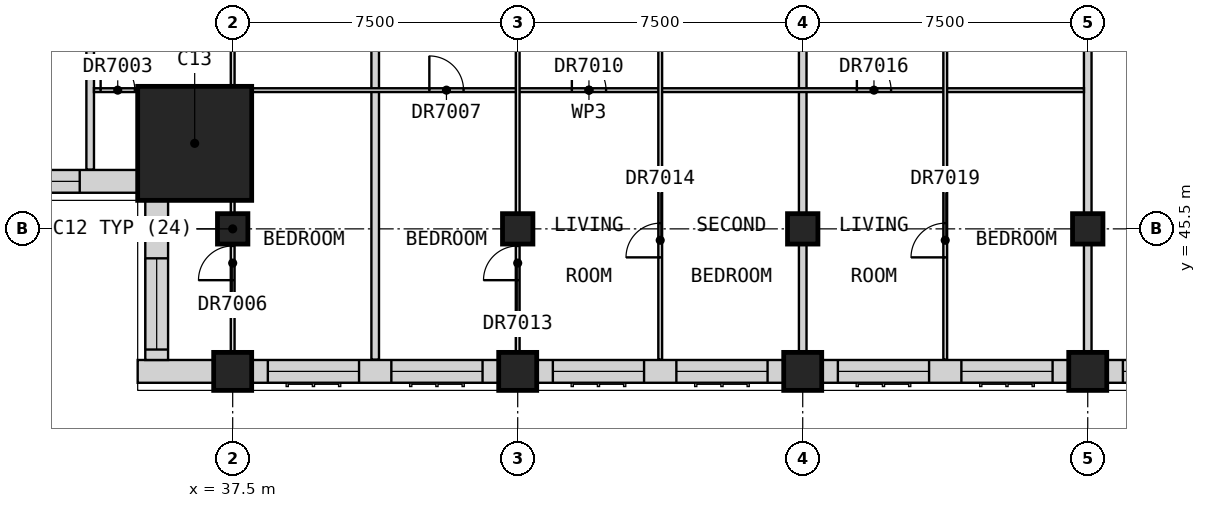
"""IFC4 building model, lengths in metres.
Left out: names, types, materials, properties, quantities, classifications, styles, units other than length and angle.
Written with IfcOpenShell. Run it as: python <this file> out.ifc"""

import sys

from ifc_helpers import new_model, si_unit, direction, frame, frame_2d, origin, origin_2d, place, context, subcontext, project, spatial, rectangle, extrude, element, fill, save


model = new_model("IFC4")
c1 = context("Model", 3, precision=1e-05, world=origin(), true_north=direction((0.0, 1.0)))
c2 = subcontext(c1, "Body", "Model", "MODEL_VIEW")
j1 = project(units=[si_unit("LENGTHUNIT", "METRE"), si_unit("PLANEANGLEUNIT", "RADIAN")], contexts=[c1])
p1 = place(None, origin())
s1 = spatial("IfcSite", under=j1, at=p1, CompositionType="ELEMENT")
p2 = place(p1, origin())
s2 = spatial("IfcBuilding", under=s1, at=p2, CompositionType="ELEMENT")
p3 = place(p2, frame((0.0, 0.0, 230.2)))
s3 = spatial("IfcBuildingStorey", under=s2, at=p3, CompositionType="ELEMENT", Elevation=230.2)
for number, where, z_axis, x_axis in (
    (1, (37.5, 41.75, 0.0), (0.0, 0.0, 1.0), (1.0, 0.0, 0.0)),
    (2, (45.0, 41.75, 0.0), (0.0, 0.0, 1.0), (1.0, 0.0, 0.0)),
    (3, (52.5, 41.75, 0.0), (0.0, 0.0, 1.0), (1.0, 0.0, 0.0)),
    (4, (60.0, 41.75, 0.0), (0.0, 0.0, 1.0), (1.0, 0.0, 0.0)),
):
    element("IfcColumn", number, at=place(p3, frame(where, z_axis=z_axis, x_axis=x_axis)), inside=s3, PredefinedType="COLUMN", context=c2, shape_type="SweptSolid", body=[
        extrude(rectangle(XDim=1.0, YDim=1.0, at=origin_2d()), origin(), (0.0, 0.0, 1.0), 3.5),
    ])
for number, where, z_axis, x_axis in (
    (5, (37.5, 45.5, 0.0), (0.0, 0.0, 1.0), (1.0, 0.0, 0.0)),
    (6, (45.0, 45.5, 0.0), (0.0, 0.0, 1.0), (1.0, 0.0, 0.0)),
    (7, (52.5, 45.5, 0.0), (0.0, 0.0, 1.0), (1.0, 0.0, 0.0)),
    (8, (60.0, 45.5, 0.0), (0.0, 0.0, 1.0), (1.0, 0.0, 0.0)),
):
    element("IfcColumn", number, at=place(p3, frame(where, z_axis=z_axis, x_axis=x_axis)), inside=s3, PredefinedType="COLUMN", context=c2, shape_type="SweptSolid", body=[
        extrude(rectangle(XDim=0.8, YDim=0.8, at=origin_2d()), origin(), (0.0, 0.0, 1.0), 3.5),
    ])
p4 = place(p3, frame((36.5, 47.75, 0.0), z_axis=(0.0, 0.0, 1.0), x_axis=(1.0, 0.0, 0.0)))
e9 = element("IfcColumn", 9, at=p4, inside=s3, PredefinedType="COLUMN", context=c2, shape_type="SweptSolid", body=[
    extrude(rectangle(XDim=3.0, YDim=3.0, at=origin_2d()), origin(), (0.0, 0.0, 1.0), 3.5),
])
p5 = place(p3, frame((35.0, 41.75, 0.0), z_axis=(0.0, 0.0, 1.0), x_axis=(1.0, 0.0, 0.0)))
e10 = element("IfcWall", 10, at=p5, inside=s3, PredefinedType="SOLIDWALL", context=c2, shape_type="SweptSolid", body=[
    extrude(rectangle(XDim=2.0, YDim=0.6, at=frame_2d((1.0, 0.0))), origin(), (0.0, 0.0, 1.0), 3.25),
])
p6 = place(p3, frame((38.0, 41.75, 0.0), z_axis=(0.0, 0.0, 1.0), x_axis=(1.0, 0.0, 0.0)))
e11 = element("IfcWall", 11, at=p6, inside=s3, PredefinedType="SOLIDWALL", context=c2, shape_type="SweptSolid", body=[
    extrude(rectangle(XDim=6.5, YDim=0.6, at=frame_2d((3.25, 0.0))), origin(), (0.0, 0.0, 1.0), 2.75),
])
p7 = place(p6, frame((0.425, 0.0, 0.8)))
e12 = element("IfcOpeningElement", 12, at=p7, cuts=e11, PredefinedType="OPENING", context=c2, shape_type="SweptSolid", body=[
    extrude(rectangle(XDim=2.4, YDim=1.8, at=frame_2d((1.2, 0.9))), frame((0.0, 0.31, 0.0), z_axis=(0.0, -1.0, 0.0), x_axis=(1.0, 0.0, 0.0)), (0.0, 0.0, 1.0), 0.62),
])
p8 = place(p6, frame((3.675, 0.0, 0.8)))
e13 = element("IfcOpeningElement", 13, at=p8, cuts=e11, PredefinedType="OPENING", context=c2, shape_type="SweptSolid", body=[
    extrude(rectangle(XDim=2.4, YDim=1.8, at=frame_2d((1.2, 0.9))), frame((0.0, 0.31, 0.0), z_axis=(0.0, -1.0, 0.0), x_axis=(1.0, 0.0, 0.0)), (0.0, 0.0, 1.0), 0.62),
])
p9 = place(p3, frame((45.5, 41.75, 0.0), z_axis=(0.0, 0.0, 1.0), x_axis=(1.0, 0.0, 0.0)))
e14 = element("IfcWall", 14, at=p9, inside=s3, PredefinedType="SOLIDWALL", context=c2, shape_type="SweptSolid", body=[
    extrude(rectangle(XDim=6.5, YDim=0.6, at=frame_2d((3.25, 0.0))), origin(), (0.0, 0.0, 1.0), 2.75),
])
p10 = place(p9, frame((0.425, 0.0, 0.8)))
e15 = element("IfcOpeningElement", 15, at=p10, cuts=e14, PredefinedType="OPENING", context=c2, shape_type="SweptSolid", body=[
    extrude(rectangle(XDim=2.4, YDim=1.8, at=frame_2d((1.2, 0.9))), frame((0.0, 0.31, 0.0), z_axis=(0.0, -1.0, 0.0), x_axis=(1.0, 0.0, 0.0)), (0.0, 0.0, 1.0), 0.62),
])
p11 = place(p9, frame((3.675, 0.0, 0.8)))
e16 = element("IfcOpeningElement", 16, at=p11, cuts=e14, PredefinedType="OPENING", context=c2, shape_type="SweptSolid", body=[
    extrude(rectangle(XDim=2.4, YDim=1.8, at=frame_2d((1.2, 0.9))), frame((0.0, 0.31, 0.0), z_axis=(0.0, -1.0, 0.0), x_axis=(1.0, 0.0, 0.0)), (0.0, 0.0, 1.0), 0.62),
])
p12 = place(p3, frame((53.0, 41.75, 0.0), z_axis=(0.0, 0.0, 1.0), x_axis=(1.0, 0.0, 0.0)))
e17 = element("IfcWall", 17, at=p12, inside=s3, PredefinedType="SOLIDWALL", context=c2, shape_type="SweptSolid", body=[
    extrude(rectangle(XDim=6.5, YDim=0.6, at=frame_2d((3.25, 0.0))), origin(), (0.0, 0.0, 1.0), 2.75),
])
p13 = place(p12, frame((0.425, 0.0, 0.8)))
e18 = element("IfcOpeningElement", 18, at=p13, cuts=e17, PredefinedType="OPENING", context=c2, shape_type="SweptSolid", body=[
    extrude(rectangle(XDim=2.4, YDim=1.8, at=frame_2d((1.2, 0.9))), frame((0.0, 0.31, 0.0), z_axis=(0.0, -1.0, 0.0), x_axis=(1.0, 0.0, 0.0)), (0.0, 0.0, 1.0), 0.62),
])
p14 = place(p12, frame((3.675, 0.0, 0.8)))
e19 = element("IfcOpeningElement", 19, at=p14, cuts=e17, PredefinedType="OPENING", context=c2, shape_type="SweptSolid", body=[
    extrude(rectangle(XDim=2.4, YDim=1.8, at=frame_2d((1.2, 0.9))), frame((0.0, 0.31, 0.0), z_axis=(0.0, -1.0, 0.0), x_axis=(1.0, 0.0, 0.0)), (0.0, 0.0, 1.0), 0.62),
])
p15 = place(p3, frame((60.5, 41.75, 0.0), z_axis=(0.0, 0.0, 1.0), x_axis=(1.0, 0.0, 0.0)))
e20 = element("IfcWall", 20, at=p15, inside=s3, PredefinedType="SOLIDWALL", context=c2, shape_type="SweptSolid", body=[
    extrude(rectangle(XDim=6.5, YDim=0.6, at=frame_2d((3.25, 0.0))), origin(), (0.0, 0.0, 1.0), 2.75),
])
p16 = place(p15, frame((0.425, 0.0, 0.8)))
e21 = element("IfcOpeningElement", 21, at=p16, cuts=e20, PredefinedType="OPENING", context=c2, shape_type="SweptSolid", body=[
    extrude(rectangle(XDim=2.4, YDim=1.8, at=frame_2d((1.2, 0.9))), frame((0.0, 0.31, 0.0), z_axis=(0.0, -1.0, 0.0), x_axis=(1.0, 0.0, 0.0)), (0.0, 0.0, 1.0), 0.62),
])
p17 = place(p15, frame((3.675, 0.0, 0.8)))
e22 = element("IfcOpeningElement", 22, at=p17, cuts=e20, PredefinedType="OPENING", context=c2, shape_type="SweptSolid", body=[
    extrude(rectangle(XDim=2.4, YDim=1.8, at=frame_2d((1.2, 0.9))), frame((0.0, 0.31, 0.0), z_axis=(0.0, -1.0, 0.0), x_axis=(1.0, 0.0, 0.0)), (0.0, 0.0, 1.0), 0.62),
])
p18 = place(p3, frame((30.8, 46.75, 0.0), z_axis=(0.0, 0.0, 1.0), x_axis=(1.0, 0.0, 0.0)))
e23 = element("IfcWall", 23, at=p18, inside=s3, PredefinedType="SOLIDWALL", context=c2, shape_type="SweptSolid", body=[
    extrude(rectangle(XDim=4.2, YDim=0.6, at=frame_2d((2.1, 0.0))), origin(), (0.0, 0.0, 1.0), 3.25),
])
p19 = place(p18, frame((0.275, 0.0, 0.8)))
e24 = element("IfcOpeningElement", 24, at=p19, cuts=e23, PredefinedType="OPENING", context=c2, shape_type="SweptSolid", body=[
    extrude(rectangle(XDim=2.4, YDim=1.8, at=frame_2d((1.2, 0.9))), frame((0.0, 0.31, 0.0), z_axis=(0.0, -1.0, 0.0), x_axis=(1.0, 0.0, 0.0)), (0.0, 0.0, 1.0), 0.62),
])
p20 = place(p3, frame((35.5, 46.25, 0.0), z_axis=(0.0, 0.0, 1.0), x_axis=(0.0, -1.0, 0.0)))
e25 = element("IfcWall", 25, at=p20, inside=s3, PredefinedType="SOLIDWALL", context=c2, shape_type="SweptSolid", body=[
    extrude(rectangle(XDim=4.2, YDim=0.6, at=frame_2d((2.1, 0.0))), origin(), (0.0, 0.0, 1.0), 3.25),
])
p21 = place(p20, frame((1.525, 0.0, 0.8)))
e26 = element("IfcOpeningElement", 26, at=p21, cuts=e25, PredefinedType="OPENING", context=c2, shape_type="SweptSolid", body=[
    extrude(rectangle(XDim=2.4, YDim=1.8, at=frame_2d((1.2, 0.9))), frame((0.0, 0.31, 0.0), z_axis=(0.0, -1.0, 0.0), x_axis=(1.0, 0.0, 0.0)), (0.0, 0.0, 1.0), 0.62),
])
p22 = place(p3, frame((33.75, 47.06, 0.0), z_axis=(0.0, 0.0, 1.0), x_axis=(0.0, 1.0, 0.0)))
e27 = element("IfcWall", 27, at=p22, inside=s3, PredefinedType="PARTITIONING", context=c2, shape_type="SweptSolid", body=[
    extrude(rectangle(XDim=11.14, YDim=0.2, at=frame_2d((5.57, 0.0))), origin(), (0.0, 0.0, 1.0), 3.25),
])
p23 = place(p3, frame((41.25, 42.06, 0.0), z_axis=(0.0, 0.0, 1.0), x_axis=(0.0, 1.0, 0.0)))
e28 = element("IfcWall", 28, at=p23, inside=s3, PredefinedType="PARTITIONING", context=c2, shape_type="SweptSolid", body=[
    extrude(rectangle(XDim=16.065, YDim=0.2, at=frame_2d((8.032, 0.0))), origin(), (0.0, 0.0, 1.0), 3.25),
])
for number, where, z_axis, x_axis in (
    (29, (52.5, 41.25, 0.0), (0.0, 0.0, 1.0), (0.0, 1.0, 0.0)),
    (30, (60.0, 41.25, 0.0), (0.0, 0.0, 1.0), (0.0, 1.0, 0.0)),
):
    element("IfcWall", number, at=place(p3, frame(where, z_axis=z_axis, x_axis=x_axis)), inside=s3, PredefinedType="PARTITIONING", context=c2, shape_type="SweptSolid", body=[
        extrude(rectangle(XDim=16.875, YDim=0.2, at=frame_2d((8.438, 0.0))), origin(), (0.0, 0.0, 1.0), 3.25),
    ])
p24 = place(p3, frame((33.85, 49.15, 0.0), z_axis=(0.0, 0.0, 1.0), x_axis=(1.0, 0.0, 0.0)))
e31 = element("IfcWall", 31, at=p24, inside=s3, PredefinedType="PARTITIONING", context=c2, shape_type="SweptSolid", body=[
    extrude(rectangle(XDim=26.05, YDim=0.1, at=frame_2d((13.025, 0.0))), origin(), (0.0, 0.0, 1.0), 3.25),
])
p25 = place(p24, frame((0.175, 0.0, 0.0)))
e32 = element("IfcOpeningElement", 32, at=p25, cuts=e31, PredefinedType="OPENING", context=c2, shape_type="SweptSolid", body=[
    extrude(rectangle(XDim=0.9, YDim=2.1, at=frame_2d((0.45, 1.05))), frame((0.0, 0.06, 0.0), z_axis=(0.0, -1.0, 0.0), x_axis=(1.0, 0.0, 0.0)), (0.0, 0.0, 1.0), 0.12),
])
p26 = place(p24, frame((8.825, 0.0, 0.0)))
e33 = element("IfcOpeningElement", 33, at=p26, cuts=e31, PredefinedType="OPENING", context=c2, shape_type="SweptSolid", body=[
    extrude(rectangle(XDim=0.9, YDim=2.1, at=frame_2d((0.45, 1.05))), frame((0.0, 0.06, 0.0), z_axis=(0.0, -1.0, 0.0), x_axis=(1.0, 0.0, 0.0)), (0.0, 0.0, 1.0), 0.12),
])
p27 = place(p24, frame((12.575, 0.0, 0.0)))
e34 = element("IfcOpeningElement", 34, at=p27, cuts=e31, PredefinedType="OPENING", context=c2, shape_type="SweptSolid", body=[
    extrude(rectangle(XDim=0.9, YDim=2.1, at=frame_2d((0.45, 1.05))), frame((0.0, 0.06, 0.0), z_axis=(0.0, -1.0, 0.0), x_axis=(1.0, 0.0, 0.0)), (0.0, 0.0, 1.0), 0.12),
])
p28 = place(p24, frame((20.075, 0.0, 0.0)))
e35 = element("IfcOpeningElement", 35, at=p28, cuts=e31, PredefinedType="OPENING", context=c2, shape_type="SweptSolid", body=[
    extrude(rectangle(XDim=0.9, YDim=2.1, at=frame_2d((0.45, 1.05))), frame((0.0, 0.06, 0.0), z_axis=(0.0, -1.0, 0.0), x_axis=(1.0, 0.0, 0.0)), (0.0, 0.0, 1.0), 0.12),
])
p29 = place(p3, frame((37.5, 41.25, 0.0), z_axis=(0.0, 0.0, 1.0), x_axis=(0.0, 1.0, 0.0)))
e36 = element("IfcWall", 36, at=p29, inside=s3, PredefinedType="PARTITIONING", context=c2, shape_type="SweptSolid", body=[
    extrude(rectangle(XDim=12.363, YDim=0.1, at=frame_2d((6.181, 0.0))), origin(), (0.0, 0.0, 1.0), 2.75),
])
p30 = place(p29, frame((9.712, 0.0, 0.0)))
e37 = element("IfcOpeningElement", 37, at=p30, cuts=e36, PredefinedType="OPENING", context=c2, shape_type="SweptSolid", body=[
    extrude(rectangle(XDim=0.9, YDim=2.1, at=frame_2d((0.45, 1.05))), frame((0.0, 0.06, 0.0), z_axis=(0.0, -1.0, 0.0), x_axis=(1.0, 0.0, 0.0)), (0.0, 0.0, 1.0), 0.12),
])
p31 = place(p29, frame((2.9, 0.0, 0.0)))
e38 = element("IfcOpeningElement", 38, at=p31, cuts=e36, PredefinedType="OPENING", context=c2, shape_type="SweptSolid", body=[
    extrude(rectangle(XDim=0.9, YDim=2.1, at=frame_2d((0.45, 1.05))), frame((0.0, 0.06, 0.0), z_axis=(0.0, -1.0, 0.0), x_axis=(1.0, 0.0, 0.0)), (0.0, 0.0, 1.0), 0.12),
])
p32 = place(p3, frame((45.0, 41.25, 0.0), z_axis=(0.0, 0.0, 1.0), x_axis=(0.0, 1.0, 0.0)))
e39 = element("IfcWall", 39, at=p32, inside=s3, PredefinedType="PARTITIONING", context=c2, shape_type="SweptSolid", body=[
    extrude(rectangle(XDim=12.363, YDim=0.1, at=frame_2d((6.181, 0.0))), origin(), (0.0, 0.0, 1.0), 3.25),
])
p33 = place(p32, frame((2.9, 0.0, 0.0)))
e40 = element("IfcOpeningElement", 40, at=p33, cuts=e39, PredefinedType="OPENING", context=c2, shape_type="SweptSolid", body=[
    extrude(rectangle(XDim=0.9, YDim=2.1, at=frame_2d((0.45, 1.05))), frame((0.0, 0.06, 0.0), z_axis=(0.0, -1.0, 0.0), x_axis=(1.0, 0.0, 0.0)), (0.0, 0.0, 1.0), 0.12),
])
p34 = place(p3, frame((48.75, 42.06, 0.0), z_axis=(0.0, 0.0, 1.0), x_axis=(0.0, 1.0, 0.0)))
e41 = element("IfcWall", 41, at=p34, inside=s3, PredefinedType="PARTITIONING", context=c2, shape_type="SweptSolid", body=[
    extrude(rectangle(XDim=11.552, YDim=0.1, at=frame_2d((5.776, 0.0))), origin(), (0.0, 0.0, 1.0), 3.25),
])
p35 = place(p34, frame((8.903, 0.0, 0.0)))
e42 = element("IfcOpeningElement", 42, at=p35, cuts=e41, PredefinedType="OPENING", context=c2, shape_type="SweptSolid", body=[
    extrude(rectangle(XDim=0.9, YDim=2.1, at=frame_2d((0.45, 1.05))), frame((0.0, 0.06, 0.0), z_axis=(0.0, -1.0, 0.0), x_axis=(1.0, 0.0, 0.0)), (0.0, 0.0, 1.0), 0.12),
])
p36 = place(p34, frame((2.69, 0.0, 0.0)))
e43 = element("IfcOpeningElement", 43, at=p36, cuts=e41, PredefinedType="OPENING", context=c2, shape_type="SweptSolid", body=[
    extrude(rectangle(XDim=0.9, YDim=2.1, at=frame_2d((0.45, 1.05))), frame((0.0, 0.06, 0.0), z_axis=(0.0, -1.0, 0.0), x_axis=(1.0, 0.0, 0.0)), (0.0, 0.0, 1.0), 0.12),
])
p37 = place(p3, frame((56.25, 42.06, 0.0), z_axis=(0.0, 0.0, 1.0), x_axis=(0.0, 1.0, 0.0)))
e44 = element("IfcWall", 44, at=p37, inside=s3, PredefinedType="PARTITIONING", context=c2, shape_type="SweptSolid", body=[
    extrude(rectangle(XDim=11.552, YDim=0.1, at=frame_2d((5.776, 0.0))), origin(), (0.0, 0.0, 1.0), 3.25),
])
p38 = place(p37, frame((8.903, 0.0, 0.0)))
e45 = element("IfcOpeningElement", 45, at=p38, cuts=e44, PredefinedType="OPENING", context=c2, shape_type="SweptSolid", body=[
    extrude(rectangle(XDim=0.9, YDim=2.1, at=frame_2d((0.45, 1.05))), frame((0.0, 0.06, 0.0), z_axis=(0.0, -1.0, 0.0), x_axis=(1.0, 0.0, 0.0)), (0.0, 0.0, 1.0), 0.12),
])
p39 = place(p37, frame((2.69, 0.0, 0.0)))
e46 = element("IfcOpeningElement", 46, at=p39, cuts=e44, PredefinedType="OPENING", context=c2, shape_type="SweptSolid", body=[
    extrude(rectangle(XDim=0.9, YDim=2.1, at=frame_2d((0.45, 1.05))), frame((0.0, 0.06, 0.0), z_axis=(0.0, -1.0, 0.0), x_axis=(1.0, 0.0, 0.0)), (0.0, 0.0, 1.0), 0.12),
])
p40 = place(p7, origin())
e47 = element("IfcWindow", 47, at=p40, inside=s3, PartitioningType="SINGLE_PANEL", PredefinedType="WINDOW", context=c2, shape_type="SweptSolid", body=[
    extrude(rectangle(XDim=2.4, YDim=1.8, at=frame_2d((1.2, 0.9))), frame((0.0, -0.07, 0.0), z_axis=(0.0, -1.0, 0.0), x_axis=(1.0, 0.0, 0.0)), (0.0, 0.0, 1.0), 0.06),
])
fill(e12, e47)
p41 = place(p8, origin())
e48 = element("IfcWindow", 48, at=p41, inside=s3, PartitioningType="SINGLE_PANEL", PredefinedType="WINDOW", context=c2, shape_type="SweptSolid", body=[
    extrude(rectangle(XDim=2.4, YDim=1.8, at=frame_2d((1.2, 0.9))), frame((0.0, -0.07, 0.0), z_axis=(0.0, -1.0, 0.0), x_axis=(1.0, 0.0, 0.0)), (0.0, 0.0, 1.0), 0.06),
])
fill(e13, e48)
p42 = place(p10, origin())
e49 = element("IfcWindow", 49, at=p42, inside=s3, PartitioningType="SINGLE_PANEL", PredefinedType="WINDOW", context=c2, shape_type="SweptSolid", body=[
    extrude(rectangle(XDim=2.4, YDim=1.8, at=frame_2d((1.2, 0.9))), frame((0.0, -0.07, 0.0), z_axis=(0.0, -1.0, 0.0), x_axis=(1.0, 0.0, 0.0)), (0.0, 0.0, 1.0), 0.06),
])
fill(e15, e49)
p43 = place(p11, origin())
e50 = element("IfcWindow", 50, at=p43, inside=s3, PartitioningType="SINGLE_PANEL", PredefinedType="WINDOW", context=c2, shape_type="SweptSolid", body=[
    extrude(rectangle(XDim=2.4, YDim=1.8, at=frame_2d((1.2, 0.9))), frame((0.0, -0.07, 0.0), z_axis=(0.0, -1.0, 0.0), x_axis=(1.0, 0.0, 0.0)), (0.0, 0.0, 1.0), 0.06),
])
fill(e16, e50)
p44 = place(p13, origin())
e51 = element("IfcWindow", 51, at=p44, inside=s3, PartitioningType="SINGLE_PANEL", PredefinedType="WINDOW", context=c2, shape_type="SweptSolid", body=[
    extrude(rectangle(XDim=2.4, YDim=1.8, at=frame_2d((1.2, 0.9))), frame((0.0, -0.07, 0.0), z_axis=(0.0, -1.0, 0.0), x_axis=(1.0, 0.0, 0.0)), (0.0, 0.0, 1.0), 0.06),
])
fill(e18, e51)
p45 = place(p14, origin())
e52 = element("IfcWindow", 52, at=p45, inside=s3, PartitioningType="SINGLE_PANEL", PredefinedType="WINDOW", context=c2, shape_type="SweptSolid", body=[
    extrude(rectangle(XDim=2.4, YDim=1.8, at=frame_2d((1.2, 0.9))), frame((0.0, -0.07, 0.0), z_axis=(0.0, -1.0, 0.0), x_axis=(1.0, 0.0, 0.0)), (0.0, 0.0, 1.0), 0.06),
])
fill(e19, e52)
p46 = place(p16, origin())
e53 = element("IfcWindow", 53, at=p46, inside=s3, PartitioningType="SINGLE_PANEL", PredefinedType="WINDOW", context=c2, shape_type="SweptSolid", body=[
    extrude(rectangle(XDim=2.4, YDim=1.8, at=frame_2d((1.2, 0.9))), frame((0.0, -0.07, 0.0), z_axis=(0.0, -1.0, 0.0), x_axis=(1.0, 0.0, 0.0)), (0.0, 0.0, 1.0), 0.06),
])
fill(e21, e53)
p47 = place(p19, origin())
e54 = element("IfcWindow", 54, at=p47, inside=s3, PartitioningType="SINGLE_PANEL", PredefinedType="WINDOW", context=c2, shape_type="SweptSolid", body=[
    extrude(rectangle(XDim=2.4, YDim=1.8, at=frame_2d((1.2, 0.9))), frame((0.0, -0.07, 0.0), z_axis=(0.0, -1.0, 0.0), x_axis=(1.0, 0.0, 0.0)), (0.0, 0.0, 1.0), 0.06),
])
fill(e24, e54)
p48 = place(p21, origin())
e55 = element("IfcWindow", 55, at=p48, inside=s3, PartitioningType="SINGLE_PANEL", PredefinedType="WINDOW", context=c2, shape_type="SweptSolid", body=[
    extrude(rectangle(XDim=2.4, YDim=1.8, at=frame_2d((1.2, 0.9))), frame((0.0, -0.07, 0.0), z_axis=(0.0, -1.0, 0.0), x_axis=(1.0, 0.0, 0.0)), (0.0, 0.0, 1.0), 0.06),
])
fill(e26, e55)
p49 = place(p25, origin())
e56 = element("IfcDoor", 56, at=p49, inside=s3, OperationType="SINGLE_SWING_LEFT", PredefinedType="DOOR", context=c2, shape_type="SweptSolid", body=[
    extrude(rectangle(XDim=0.9, YDim=2.1, at=frame_2d((0.45, 1.05))), frame((0.0, 0.025, 0.0), z_axis=(0.0, -1.0, 0.0), x_axis=(1.0, 0.0, 0.0)), (0.0, 0.0, 1.0), 0.05),
])
fill(e32, e56)
p50 = place(p31, origin())
e57 = element("IfcDoor", 57, at=p50, inside=s3, OperationType="SINGLE_SWING_LEFT", PredefinedType="DOOR", context=c2, shape_type="SweptSolid", body=[
    extrude(rectangle(XDim=0.9, YDim=2.1, at=frame_2d((0.45, 1.05))), frame((0.0, 0.025, 0.0), z_axis=(0.0, -1.0, 0.0), x_axis=(1.0, 0.0, 0.0)), (0.0, 0.0, 1.0), 0.05),
])
fill(e38, e57)
p51 = place(p26, origin())
e58 = element("IfcDoor", 58, at=p51, inside=s3, OperationType="SINGLE_SWING_LEFT", PredefinedType="DOOR", context=c2, shape_type="SweptSolid", body=[
    extrude(rectangle(XDim=0.9, YDim=2.1, at=frame_2d((0.45, 1.05))), frame((0.0, 0.025, 0.0), z_axis=(0.0, -1.0, 0.0), x_axis=(1.0, 0.0, 0.0)), (0.0, 0.0, 1.0), 0.05),
])
fill(e33, e58)
p52 = place(p27, origin())
e59 = element("IfcDoor", 59, at=p52, inside=s3, OperationType="SINGLE_SWING_LEFT", PredefinedType="DOOR", context=c2, shape_type="SweptSolid", body=[
    extrude(rectangle(XDim=0.9, YDim=2.1, at=frame_2d((0.45, 1.05))), frame((0.0, 0.025, 0.0), z_axis=(0.0, -1.0, 0.0), x_axis=(1.0, 0.0, 0.0)), (0.0, 0.0, 1.0), 0.05),
])
fill(e34, e59)
p53 = place(p33, origin())
e60 = element("IfcDoor", 60, at=p53, inside=s3, OperationType="SINGLE_SWING_LEFT", PredefinedType="DOOR", context=c2, shape_type="SweptSolid", body=[
    extrude(rectangle(XDim=0.9, YDim=2.1, at=frame_2d((0.45, 1.05))), frame((0.0, 0.025, 0.0), z_axis=(0.0, -1.0, 0.0), x_axis=(1.0, 0.0, 0.0)), (0.0, 0.0, 1.0), 0.05),
])
fill(e40, e60)
p54 = place(p36, origin())
e61 = element("IfcDoor", 61, at=p54, inside=s3, OperationType="SINGLE_SWING_LEFT", PredefinedType="DOOR", context=c2, shape_type="SweptSolid", body=[
    extrude(rectangle(XDim=0.9, YDim=2.1, at=frame_2d((0.45, 1.05))), frame((0.0, 0.025, 0.0), z_axis=(0.0, -1.0, 0.0), x_axis=(1.0, 0.0, 0.0)), (0.0, 0.0, 1.0), 0.05),
])
fill(e43, e61)
p55 = place(p28, origin())
e62 = element("IfcDoor", 62, at=p55, inside=s3, OperationType="SINGLE_SWING_LEFT", PredefinedType="DOOR", context=c2, shape_type="SweptSolid", body=[
    extrude(rectangle(XDim=0.9, YDim=2.1, at=frame_2d((0.45, 1.05))), frame((0.0, 0.025, 0.0), z_axis=(0.0, -1.0, 0.0), x_axis=(1.0, 0.0, 0.0)), (0.0, 0.0, 1.0), 0.05),
])
fill(e35, e62)
p56 = place(p39, origin())
e63 = element("IfcDoor", 63, at=p56, inside=s3, OperationType="SINGLE_SWING_LEFT", PredefinedType="DOOR", context=c2, shape_type="SweptSolid", body=[
    extrude(rectangle(XDim=0.9, YDim=2.1, at=frame_2d((0.45, 1.05))), frame((0.0, 0.025, 0.0), z_axis=(0.0, -1.0, 0.0), x_axis=(1.0, 0.0, 0.0)), (0.0, 0.0, 1.0), 0.05),
])
fill(e46, e63)
save(model, sys.argv[1])
